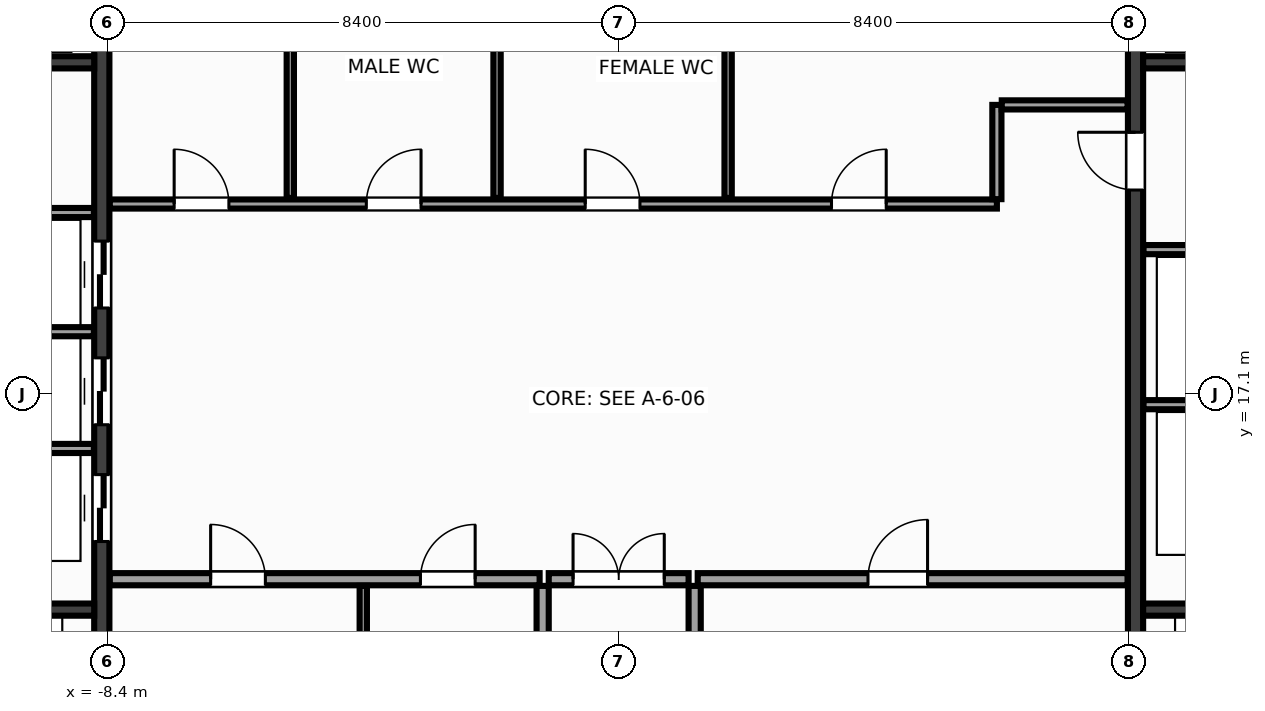
"""IFC4 building model, lengths in metres.
Left out: names, types, materials, properties, quantities, classifications, styles, units other than length and angle.
Written with IfcOpenShell. Run it as: python <this file> out.ifc"""

import sys

from ifc_helpers import new_model, si_unit, direction, frame, frame_2d, origin, place, context, subcontext, project, spatial, rectangle, extrude, source, transform, mapped, element, fill, save


model = new_model("IFC4")
c1 = context("Model", 3, precision=1e-05, world=origin(), true_north=direction((0.0, 1.0)))
c2 = subcontext(c1, "Body", "Model", "MODEL_VIEW")
j1 = project(units=[si_unit("LENGTHUNIT", "METRE"), si_unit("PLANEANGLEUNIT", "RADIAN")], contexts=[c1])
p1 = place(None, origin())
s1 = spatial("IfcSite", under=j1, at=p1, CompositionType="ELEMENT")
p2 = place(p1, origin())
s2 = spatial("IfcBuilding", under=s1, at=p2, CompositionType="ELEMENT")
p3 = place(p2, frame((0.0, 0.0, 239.6)))
s3 = spatial("IfcBuildingStorey", under=s2, at=p3, CompositionType="ELEMENT", Elevation=239.6)
m1 = source(origin(), c2, "Body", "SweptSolid", [
    extrude(rectangle(XDim=13.1, YDim=0.25, at=frame_2d((6.55, 0.0))), origin(), (0.0, 0.0, 1.0), 3.6),
])
p4 = place(p3, frame((-8.5, 10.45, 0.0), z_axis=(0.0, 0.0, 1.0), x_axis=(0.0, 1.0, 0.0)))
e1 = element("IfcWall", 1, at=p4, inside=s3, PredefinedType="SHEAR", context=c2, shape_type="MappedRepresentation", body=[
    mapped(m1, transform((0.0, 0.0, 0.0), x_axis=(1.0, 0.0, 0.0), y_axis=(0.0, 1.0, 0.0), z_axis=(0.0, 0.0, 1.0), scale=1.0)),
])
p5 = place(p4, frame((4.22, 0.0, 0.0)))
e2 = element("IfcOpeningElement", 2, at=p5, cuts=e1, PredefinedType="OPENING", context=c2, shape_type="SweptSolid", body=[
    extrude(rectangle(XDim=1.1, YDim=2.15, at=frame_2d((0.55, 1.075))), frame((0.0, 0.137, 0.0), z_axis=(0.0, -1.0, 0.0), x_axis=(1.0, 0.0, 0.0)), (0.0, 0.0, 1.0), 0.274),
])
p6 = place(p4, frame((6.14, 0.0, 0.0)))
e3 = element("IfcOpeningElement", 3, at=p6, cuts=e1, PredefinedType="OPENING", context=c2, shape_type="SweptSolid", body=[
    extrude(rectangle(XDim=1.1, YDim=2.15, at=frame_2d((0.55, 1.075))), frame((0.0, 0.137, 0.0), z_axis=(0.0, -1.0, 0.0), x_axis=(1.0, 0.0, 0.0)), (0.0, 0.0, 1.0), 0.274),
])
p7 = place(p4, frame((8.06, 0.0, 0.0)))
e4 = element("IfcOpeningElement", 4, at=p7, cuts=e1, PredefinedType="OPENING", context=c2, shape_type="SweptSolid", body=[
    extrude(rectangle(XDim=1.1, YDim=2.15, at=frame_2d((0.55, 1.075))), frame((0.0, 0.137, 0.0), z_axis=(0.0, -1.0, 0.0), x_axis=(1.0, 0.0, 0.0)), (0.0, 0.0, 1.0), 0.274),
])
p8 = place(p3, frame((8.5, 10.45, 0.0), z_axis=(0.0, 0.0, 1.0), x_axis=(0.0, 1.0, 0.0)))
e5 = element("IfcWall", 5, at=p8, inside=s3, PredefinedType="SHEAR", context=c2, shape_type="MappedRepresentation", body=[
    mapped(m1, transform((0.0, 0.0, 0.0), x_axis=(1.0, 0.0, 0.0), y_axis=(0.0, 1.0, 0.0), z_axis=(0.0, 0.0, 1.0), scale=1.0)),
])
p9 = place(p8, frame((10.0, 0.0, 0.0)))
e6 = element("IfcOpeningElement", 6, at=p9, cuts=e5, PredefinedType="OPENING", context=c2, shape_type="SweptSolid", body=[
    extrude(rectangle(XDim=0.95, YDim=2.15, at=frame_2d((0.475, 1.075))), frame((0.0, 0.137, 0.0), z_axis=(0.0, -1.0, 0.0), x_axis=(1.0, 0.0, 0.0)), (0.0, 0.0, 1.0), 0.274),
])
m2 = source(origin(), c2, "Body", "SweptSolid", [
    extrude(rectangle(XDim=2.825, YDim=0.2, at=frame_2d((1.413, 0.0))), origin(), (0.0, 0.0, 1.0), 3.6),
])
for number, where, z_axis, x_axis in (
    (7, (-11.45, 13.55, 0.0), (0.0, 0.0, 1.0), (1.0, 0.0, 0.0)),
    (8, (8.625, 13.55, 0.0), (0.0, 0.0, 1.0), (1.0, 0.0, 0.0)),
):
    element("IfcWall", number, at=place(p3, frame(where, z_axis=z_axis, x_axis=x_axis)), inside=s3, PredefinedType="SHEAR", context=c2, shape_type="MappedRepresentation", body=[
        mapped(m2, transform((0.0, 0.0, 0.0), x_axis=(1.0, 0.0, 0.0), y_axis=(0.0, 1.0, 0.0), z_axis=(0.0, 0.0, 1.0), scale=1.0)),
    ])
m3 = source(origin(), c2, "Body", "SweptSolid", [
    extrude(rectangle(XDim=3.02, YDim=0.2, at=frame_2d((1.51, 0.0))), origin(), (0.0, 0.0, 1.0), 3.6),
])
for number, where, z_axis, x_axis in (
    (9, (-11.645, 22.55, 0.0), (0.0, 0.0, 1.0), (1.0, 0.0, 0.0)),
    (10, (8.625, 22.55, 0.0), (0.0, 0.0, 1.0), (1.0, 0.0, 0.0)),
):
    element("IfcWall", number, at=place(p3, frame(where, z_axis=z_axis, x_axis=x_axis)), inside=s3, PredefinedType="SHEAR", context=c2, shape_type="MappedRepresentation", body=[
        mapped(m3, transform((0.0, 0.0, 0.0), x_axis=(1.0, 0.0, 0.0), y_axis=(0.0, 1.0, 0.0), z_axis=(0.0, 0.0, 1.0), scale=1.0)),
    ])
m4 = source(origin(), c2, "Body", "SweptSolid", [
    extrude(rectangle(XDim=3.01, YDim=0.15, at=frame_2d((1.505, 0.0))), origin(), (0.0, 0.0, 1.0), 3.37),
])
for number, where, z_axis, x_axis in (
    (11, (-11.64, 16.2, 0.0), (0.0, 0.0, 1.0), (1.0, 0.0, 0.0)),
    (12, (-11.64, 18.12, 0.0), (0.0, 0.0, 1.0), (1.0, 0.0, 0.0)),
    (13, (-11.64, 20.08, 0.0), (0.0, 0.0, 1.0), (1.0, 0.0, 0.0)),
    (14, (8.63, 16.92, 0.0), (0.0, 0.0, 1.0), (1.0, 0.0, 0.0)),
    (15, (8.63, 19.47, 0.0), (0.0, 0.0, 1.0), (1.0, 0.0, 0.0)),
):
    element("IfcWall", number, at=place(p3, frame(where, z_axis=z_axis, x_axis=x_axis)), inside=s3, PredefinedType="PARTITIONING", context=c2, shape_type="MappedRepresentation", body=[
        mapped(m4, transform((0.0, 0.0, 0.0), x_axis=(1.0, 0.0, 0.0), y_axis=(0.0, 1.0, 0.0), z_axis=(0.0, 0.0, 1.0), scale=1.0)),
    ])
m5 = source(origin(), c2, "Body", "SweptSolid", [
    extrude(rectangle(XDim=7.07, YDim=0.2, at=frame_2d((3.535, 0.0))), origin(), (0.0, 0.0, 1.0), 3.37),
])
p10 = place(p3, frame((-8.37, 14.05, 0.0), z_axis=(0.0, 0.0, 1.0), x_axis=(1.0, 0.0, 0.0)))
e16 = element("IfcWall", 16, at=p10, inside=s3, PredefinedType="PARTITIONING", context=c2, shape_type="MappedRepresentation", body=[
    mapped(m5, transform((0.0, 0.0, 0.0), x_axis=(1.0, 0.0, 0.0), y_axis=(0.0, 1.0, 0.0), z_axis=(0.0, 0.0, 1.0), scale=1.0)),
])
p11 = place(p10, frame((1.66, 0.0, 0.0)))
e17 = element("IfcOpeningElement", 17, at=p11, cuts=e16, PredefinedType="OPENING", context=c2, shape_type="SweptSolid", body=[
    extrude(rectangle(XDim=0.9, YDim=2.15, at=frame_2d((0.45, 1.075))), frame((0.0, 0.112, 0.0), z_axis=(0.0, -1.0, 0.0), x_axis=(1.0, 0.0, 0.0)), (0.0, 0.0, 1.0), 0.224),
])
p12 = place(p10, frame((5.11, 0.0, 0.0)))
e18 = element("IfcOpeningElement", 18, at=p12, cuts=e16, PredefinedType="OPENING", context=c2, shape_type="SweptSolid", body=[
    extrude(rectangle(XDim=0.9, YDim=2.15, at=frame_2d((0.45, 1.075))), frame((0.0, 0.112, 0.0), z_axis=(0.0, -1.0, 0.0), x_axis=(1.0, 0.0, 0.0)), (0.0, 0.0, 1.0), 0.224),
])
p13 = place(p3, frame((1.3, 14.05, 0.0), z_axis=(0.0, 0.0, 1.0), x_axis=(1.0, 0.0, 0.0)))
e19 = element("IfcWall", 19, at=p13, inside=s3, PredefinedType="PARTITIONING", context=c2, shape_type="MappedRepresentation", body=[
    mapped(m5, transform((0.0, 0.0, 0.0), x_axis=(1.0, 0.0, 0.0), y_axis=(0.0, 1.0, 0.0), z_axis=(0.0, 0.0, 1.0), scale=1.0)),
])
p14 = place(p13, frame((2.8, 0.0, 0.0)))
e20 = element("IfcOpeningElement", 20, at=p14, cuts=e19, PredefinedType="OPENING", context=c2, shape_type="SweptSolid", body=[
    extrude(rectangle(XDim=0.98, YDim=2.15, at=frame_2d((0.49, 1.075))), frame((0.0, 0.112, 0.0), z_axis=(0.0, -1.0, 0.0), x_axis=(1.0, 0.0, 0.0)), (0.0, 0.0, 1.0), 0.224),
])
m6 = source(origin(), c2, "Body", "SweptSolid", [
    extrude(rectangle(XDim=3.49, YDim=0.2, at=frame_2d((1.745, 0.0))), origin(), (0.0, 0.0, 1.0), 3.37),
])
for number, where, z_axis, x_axis in (
    (21, (-1.25, 10.45, 0.0), (0.0, 0.0, 1.0), (0.0, 1.0, 0.0)),
    (22, (1.25, 10.45, 0.0), (0.0, 0.0, 1.0), (0.0, 1.0, 0.0)),
):
    element("IfcWall", number, at=place(p3, frame(where, z_axis=z_axis, x_axis=x_axis)), inside=s3, PredefinedType="PARTITIONING", context=c2, shape_type="MappedRepresentation", body=[
        mapped(m6, transform((0.0, 0.0, 0.0), x_axis=(1.0, 0.0, 0.0), y_axis=(0.0, 1.0, 0.0), z_axis=(0.0, 0.0, 1.0), scale=1.0)),
    ])
m7 = source(origin(), c2, "Body", "SweptSolid", [
    extrude(rectangle(XDim=2.3, YDim=0.2, at=frame_2d((1.15, 0.0))), origin(), (0.0, 0.0, 1.0), 3.37),
])
p15 = place(p3, frame((-1.15, 14.05, 0.0), z_axis=(0.0, 0.0, 1.0), x_axis=(1.0, 0.0, 0.0)))
e23 = element("IfcWall", 23, at=p15, inside=s3, PredefinedType="PARTITIONING", context=c2, shape_type="MappedRepresentation", body=[
    mapped(m7, transform((0.0, 0.0, 0.0), x_axis=(1.0, 0.0, 0.0), y_axis=(0.0, 1.0, 0.0), z_axis=(0.0, 0.0, 1.0), scale=1.0)),
])
p16 = place(p15, frame((0.4, 0.0, 0.0)))
e24 = element("IfcOpeningElement", 24, at=p16, cuts=e23, PredefinedType="OPENING", context=c2, shape_type="SweptSolid", body=[
    extrude(rectangle(XDim=1.5, YDim=2.2, at=frame_2d((0.75, 1.1))), frame((0.0, 0.112, 0.0), z_axis=(0.0, -1.0, 0.0), x_axis=(1.0, 0.0, 0.0)), (0.0, 0.0, 1.0), 0.224),
])
m8 = source(origin(), c2, "Body", "SweptSolid", [
    extrude(rectangle(XDim=14.59, YDim=0.15, at=frame_2d((7.295, 0.0))), origin(), (0.0, 0.0, 1.0), 3.37),
])
p17 = place(p3, frame((-8.37, 20.22, 0.0), z_axis=(0.0, 0.0, 1.0), x_axis=(1.0, 0.0, 0.0)))
e25 = element("IfcWall", 25, at=p17, inside=s3, PredefinedType="PARTITIONING", context=c2, shape_type="MappedRepresentation", body=[
    mapped(m8, transform((0.0, 0.0, 0.0), x_axis=(1.0, 0.0, 0.0), y_axis=(0.0, 1.0, 0.0), z_axis=(0.0, 0.0, 1.0), scale=1.0)),
])
p18 = place(p17, frame((1.06, 0.0, 0.0)))
e26 = element("IfcOpeningElement", 26, at=p18, cuts=e25, PredefinedType="OPENING", context=c2, shape_type="SweptSolid", body=[
    extrude(rectangle(XDim=0.9, YDim=2.15, at=frame_2d((0.45, 1.075))), frame((0.0, 0.087, 0.0), z_axis=(0.0, -1.0, 0.0), x_axis=(1.0, 0.0, 0.0)), (0.0, 0.0, 1.0), 0.174),
])
p19 = place(p17, frame((4.22, 0.0, 0.0)))
e27 = element("IfcOpeningElement", 27, at=p19, cuts=e25, PredefinedType="OPENING", context=c2, shape_type="SweptSolid", body=[
    extrude(rectangle(XDim=0.9, YDim=2.15, at=frame_2d((0.45, 1.075))), frame((0.0, 0.087, 0.0), z_axis=(0.0, -1.0, 0.0), x_axis=(1.0, 0.0, 0.0)), (0.0, 0.0, 1.0), 0.174),
])
p20 = place(p17, frame((7.82, 0.0, 0.0)))
e28 = element("IfcOpeningElement", 28, at=p20, cuts=e25, PredefinedType="OPENING", context=c2, shape_type="SweptSolid", body=[
    extrude(rectangle(XDim=0.9, YDim=2.15, at=frame_2d((0.45, 1.075))), frame((0.0, 0.087, 0.0), z_axis=(0.0, -1.0, 0.0), x_axis=(1.0, 0.0, 0.0)), (0.0, 0.0, 1.0), 0.174),
])
p21 = place(p17, frame((11.87, 0.0, 0.0)))
e29 = element("IfcOpeningElement", 29, at=p21, cuts=e25, PredefinedType="OPENING", context=c2, shape_type="SweptSolid", body=[
    extrude(rectangle(XDim=0.9, YDim=2.15, at=frame_2d((0.45, 1.075))), frame((0.0, 0.087, 0.0), z_axis=(0.0, -1.0, 0.0), x_axis=(1.0, 0.0, 0.0)), (0.0, 0.0, 1.0), 0.174),
])
m9 = source(origin(), c2, "Body", "SweptSolid", [
    extrude(rectangle(XDim=1.55, YDim=0.15, at=frame_2d((0.775, 0.0))), origin(), (0.0, 0.0, 1.0), 3.37),
])
p22 = place(p3, frame((6.22, 20.3, 0.0), z_axis=(0.0, 0.0, 1.0), x_axis=(0.0, 1.0, 0.0)))
e30 = element("IfcWall", 30, at=p22, inside=s3, PredefinedType="PARTITIONING", context=c2, shape_type="MappedRepresentation", body=[
    mapped(m9, transform((0.0, 0.0, 0.0), x_axis=(1.0, 0.0, 0.0), y_axis=(0.0, 1.0, 0.0), z_axis=(0.0, 0.0, 1.0), scale=1.0)),
])
m10 = source(origin(), c2, "Body", "SweptSolid", [
    extrude(rectangle(XDim=2.07, YDim=0.15, at=frame_2d((1.035, 0.0))), origin(), (0.0, 0.0, 1.0), 3.37),
])
p23 = place(p3, frame((6.3, 21.85, 0.0), z_axis=(0.0, 0.0, 1.0), x_axis=(1.0, 0.0, 0.0)))
e31 = element("IfcWall", 31, at=p23, inside=s3, PredefinedType="PARTITIONING", context=c2, shape_type="MappedRepresentation", body=[
    mapped(m10, transform((0.0, 0.0, 0.0), x_axis=(1.0, 0.0, 0.0), y_axis=(0.0, 1.0, 0.0), z_axis=(0.0, 0.0, 1.0), scale=1.0)),
])
m11 = source(origin(), c2, "Body", "SweptSolid", [
    extrude(rectangle(XDim=3.49, YDim=0.12, at=frame_2d((1.745, 0.0))), origin(), (0.0, 0.0, 1.0), 3.37),
])
p24 = place(p3, frame((-4.2, 10.45, 0.0), z_axis=(0.0, 0.0, 1.0), x_axis=(0.0, 1.0, 0.0)))
e32 = element("IfcWall", 32, at=p24, inside=s3, PredefinedType="PARTITIONING", context=c2, shape_type="MappedRepresentation", body=[
    mapped(m11, transform((0.0, 0.0, 0.0), x_axis=(1.0, 0.0, 0.0), y_axis=(0.0, 1.0, 0.0), z_axis=(0.0, 0.0, 1.0), scale=1.0)),
])
m12 = source(origin(), c2, "Body", "SweptSolid", [
    extrude(rectangle(XDim=3.19, YDim=0.12, at=frame_2d((1.595, 0.0))), origin(), (0.0, 0.0, 1.0), 3.37),
])
for number, where, z_axis, x_axis in (
    (33, (-5.4, 20.32, 0.0), (0.0, 0.0, 1.0), (0.0, 1.0, 0.0)),
    (34, (-2.0, 20.32, 0.0), (0.0, 0.0, 1.0), (0.0, 1.0, 0.0)),
    (35, (1.8, 20.32, 0.0), (0.0, 0.0, 1.0), (0.0, 1.0, 0.0)),
):
    element("IfcWall", number, at=place(p3, frame(where, z_axis=z_axis, x_axis=x_axis)), inside=s3, PredefinedType="PARTITIONING", context=c2, shape_type="MappedRepresentation", body=[
        mapped(m12, transform((0.0, 0.0, 0.0), x_axis=(1.0, 0.0, 0.0), y_axis=(0.0, 1.0, 0.0), z_axis=(0.0, 0.0, 1.0), scale=1.0)),
    ])
m13 = source(origin(), c2, "Body", "SweptSolid", [
    extrude(rectangle(XDim=1.1, YDim=2.15, at=frame_2d((0.55, 1.075))), frame((0.0, 0.025, 0.0), z_axis=(0.0, -1.0, 0.0), x_axis=(1.0, 0.0, 0.0)), (0.0, 0.0, 1.0), 0.05),
])
p25 = place(p5, origin())
e36 = element("IfcDoor", 36, at=p25, inside=s3, OperationType="DOUBLE_DOOR_SLIDING", PredefinedType="DOOR", context=c2, shape_type="MappedRepresentation", body=[
    mapped(m13, transform((0.0, 0.0, 0.0), x_axis=(1.0, 0.0, 0.0), y_axis=(0.0, 1.0, 0.0), z_axis=(0.0, 0.0, 1.0), scale=1.0)),
])
fill(e2, e36)
p26 = place(p6, origin())
e37 = element("IfcDoor", 37, at=p26, inside=s3, OperationType="DOUBLE_DOOR_SLIDING", PredefinedType="DOOR", context=c2, shape_type="MappedRepresentation", body=[
    mapped(m13, transform((0.0, 0.0, 0.0), x_axis=(1.0, 0.0, 0.0), y_axis=(0.0, 1.0, 0.0), z_axis=(0.0, 0.0, 1.0), scale=1.0)),
])
fill(e3, e37)
p27 = place(p7, origin())
e38 = element("IfcDoor", 38, at=p27, inside=s3, OperationType="DOUBLE_DOOR_SLIDING", PredefinedType="DOOR", context=c2, shape_type="MappedRepresentation", body=[
    mapped(m13, transform((0.0, 0.0, 0.0), x_axis=(1.0, 0.0, 0.0), y_axis=(0.0, 1.0, 0.0), z_axis=(0.0, 0.0, 1.0), scale=1.0)),
])
fill(e4, e38)
m14 = source(origin(), c2, "Body", "SweptSolid", [
    extrude(rectangle(XDim=0.95, YDim=2.15, at=frame_2d((0.475, 1.075))), frame((0.0, 0.025, 0.0), z_axis=(0.0, -1.0, 0.0), x_axis=(1.0, 0.0, 0.0)), (0.0, 0.0, 1.0), 0.05),
])
p28 = place(p9, origin())
e39 = element("IfcDoor", 39, at=p28, inside=s3, OperationType="SINGLE_SWING_RIGHT", PredefinedType="DOOR", context=c2, shape_type="MappedRepresentation", body=[
    mapped(m14, transform((0.0, 0.0, 0.0), x_axis=(1.0, 0.0, 0.0), y_axis=(0.0, 1.0, 0.0), z_axis=(0.0, 0.0, 1.0), scale=1.0)),
])
fill(e6, e39)
m15 = source(origin(), c2, "Body", "SweptSolid", [
    extrude(rectangle(XDim=0.9, YDim=2.15, at=frame_2d((0.45, 1.075))), frame((0.0, 0.025, 0.0), z_axis=(0.0, -1.0, 0.0), x_axis=(1.0, 0.0, 0.0)), (0.0, 0.0, 1.0), 0.05),
])
p29 = place(p11, origin())
e40 = element("IfcDoor", 40, at=p29, inside=s3, OperationType="SINGLE_SWING_LEFT", PredefinedType="DOOR", context=c2, shape_type="MappedRepresentation", body=[
    mapped(m15, transform((0.0, 0.0, 0.0), x_axis=(1.0, 0.0, 0.0), y_axis=(0.0, 1.0, 0.0), z_axis=(0.0, 0.0, 1.0), scale=1.0)),
])
fill(e17, e40)
p30 = place(p12, origin())
e41 = element("IfcDoor", 41, at=p30, inside=s3, OperationType="SINGLE_SWING_RIGHT", PredefinedType="DOOR", context=c2, shape_type="MappedRepresentation", body=[
    mapped(m15, transform((0.0, 0.0, 0.0), x_axis=(1.0, 0.0, 0.0), y_axis=(0.0, 1.0, 0.0), z_axis=(0.0, 0.0, 1.0), scale=1.0)),
])
fill(e18, e41)
m16 = source(origin(), c2, "Body", "SweptSolid", [
    extrude(rectangle(XDim=0.98, YDim=2.15, at=frame_2d((0.49, 1.075))), frame((0.0, 0.025, 0.0), z_axis=(0.0, -1.0, 0.0), x_axis=(1.0, 0.0, 0.0)), (0.0, 0.0, 1.0), 0.05),
])
p31 = place(p14, origin())
e42 = element("IfcDoor", 42, at=p31, inside=s3, OperationType="SINGLE_SWING_RIGHT", PredefinedType="DOOR", context=c2, shape_type="MappedRepresentation", body=[
    mapped(m16, transform((0.0, 0.0, 0.0), x_axis=(1.0, 0.0, 0.0), y_axis=(0.0, 1.0, 0.0), z_axis=(0.0, 0.0, 1.0), scale=1.0)),
])
fill(e20, e42)
m17 = source(origin(), c2, "Body", "SweptSolid", [
    extrude(rectangle(XDim=1.5, YDim=2.2, at=frame_2d((0.75, 1.1))), frame((0.0, 0.025, 0.0), z_axis=(0.0, -1.0, 0.0), x_axis=(1.0, 0.0, 0.0)), (0.0, 0.0, 1.0), 0.05),
])
p32 = place(p16, origin())
e43 = element("IfcDoor", 43, at=p32, inside=s3, OperationType="DOUBLE_DOOR_SINGLE_SWING", PredefinedType="DOOR", context=c2, shape_type="MappedRepresentation", body=[
    mapped(m17, transform((0.0, 0.0, 0.0), x_axis=(1.0, 0.0, 0.0), y_axis=(0.0, 1.0, 0.0), z_axis=(0.0, 0.0, 1.0), scale=1.0)),
])
fill(e24, e43)
p33 = place(p18, origin())
e44 = element("IfcDoor", 44, at=p33, inside=s3, OperationType="SINGLE_SWING_LEFT", PredefinedType="DOOR", context=c2, shape_type="MappedRepresentation", body=[
    mapped(m15, transform((0.0, 0.0, 0.0), x_axis=(1.0, 0.0, 0.0), y_axis=(0.0, 1.0, 0.0), z_axis=(0.0, 0.0, 1.0), scale=1.0)),
])
fill(e26, e44)
p34 = place(p19, origin())
e45 = element("IfcDoor", 45, at=p34, inside=s3, OperationType="SINGLE_SWING_RIGHT", PredefinedType="DOOR", context=c2, shape_type="MappedRepresentation", body=[
    mapped(m15, transform((0.0, 0.0, 0.0), x_axis=(1.0, 0.0, 0.0), y_axis=(0.0, 1.0, 0.0), z_axis=(0.0, 0.0, 1.0), scale=1.0)),
])
fill(e27, e45)
p35 = place(p20, origin())
e46 = element("IfcDoor", 46, at=p35, inside=s3, OperationType="SINGLE_SWING_LEFT", PredefinedType="DOOR", context=c2, shape_type="MappedRepresentation", body=[
    mapped(m15, transform((0.0, 0.0, 0.0), x_axis=(1.0, 0.0, 0.0), y_axis=(0.0, 1.0, 0.0), z_axis=(0.0, 0.0, 1.0), scale=1.0)),
])
fill(e28, e46)
p36 = place(p21, origin())
e47 = element("IfcDoor", 47, at=p36, inside=s3, OperationType="SINGLE_SWING_RIGHT", PredefinedType="DOOR", context=c2, shape_type="MappedRepresentation", body=[
    mapped(m15, transform((0.0, 0.0, 0.0), x_axis=(1.0, 0.0, 0.0), y_axis=(0.0, 1.0, 0.0), z_axis=(0.0, 0.0, 1.0), scale=1.0)),
])
fill(e29, e47)
save(model, sys.argv[1])
